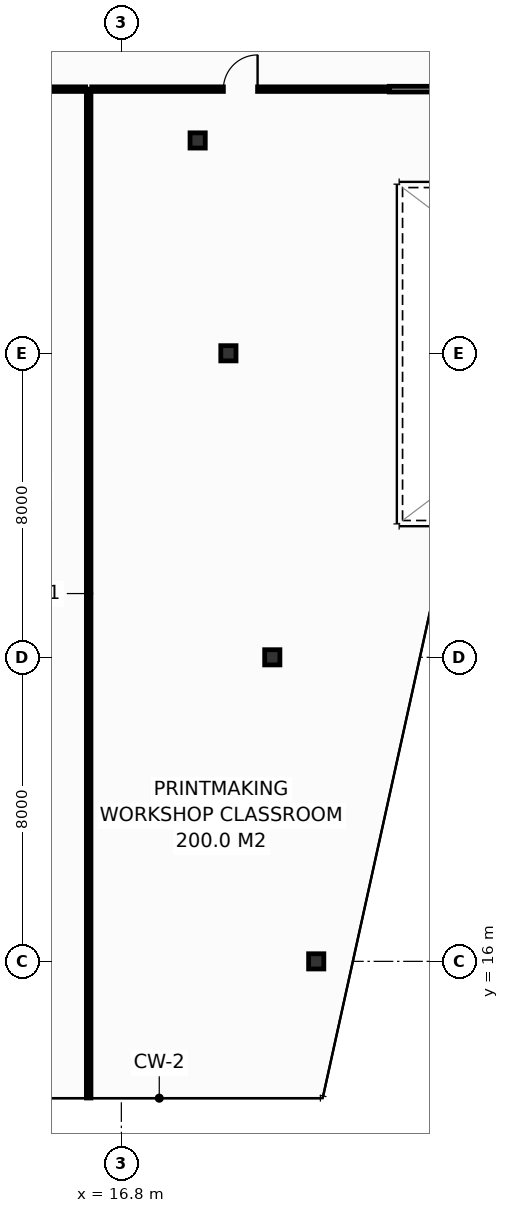
"""IFC4 building model, lengths in metres.
Left out: names, types, materials, properties, quantities, classifications, styles, units other than length and angle.
Written with IfcOpenShell. Run it as: python <this file> out.ifc"""

import sys

from ifc_helpers import new_model, si_unit, direction, frame, frame_2d, origin, origin_2d, place, context, subcontext, project, spatial, rectangle, hollow_rectangle, extrude, element, fill, save


model = new_model("IFC4")
c1 = context("Model", 3, precision=1e-05, world=origin(), true_north=direction((0.0, 1.0)))
c2 = subcontext(c1, "Body", "Model", "MODEL_VIEW")
j1 = project(units=[si_unit("LENGTHUNIT", "METRE"), si_unit("PLANEANGLEUNIT", "RADIAN")], contexts=[c1])
p1 = place(None, origin())
s1 = spatial("IfcSite", under=j1, at=p1, CompositionType="ELEMENT")
p2 = place(p1, origin())
s2 = spatial("IfcBuilding", under=s1, at=p2, CompositionType="ELEMENT")
p3 = place(p2, frame((0.0, 0.0, 220.8)))
s3 = spatial("IfcBuildingStorey", under=s2, at=p3, CompositionType="ELEMENT", Elevation=220.8)
for number, where, z_axis, x_axis in (
    (1, (21.928, 16.0, 0.0), (0.0, 0.0, 1.0), (1.0, 0.0, 0.0)),
    (2, (20.772, 24.0, 0.0), (0.0, 0.0, 1.0), (1.0, 0.0, 0.0)),
    (3, (19.617, 32.0, 0.0), (0.0, 0.0, 1.0), (1.0, 0.0, 0.0)),
    (4, (18.808, 37.6, 0.0), (0.0, 0.0, 1.0), (1.0, 0.0, 0.0)),
):
    element("IfcColumn", number, at=place(p3, frame(where, z_axis=z_axis, x_axis=x_axis)), inside=s3, PredefinedType="COLUMN", context=c2, shape_type="SweptSolid", body=[
        extrude(hollow_rectangle(XDim=0.4, YDim=0.4, WallThickness=0.016, at=origin_2d()), origin(), (0.0, 0.0, 1.0), 3.8),
    ])
p4 = place(p3, frame((15.94, 12.405, 0.0), z_axis=(0.0, 0.0, 1.0), x_axis=(0.0, 1.0, 0.0)))
e5 = element("IfcWall", 5, at=p4, inside=s3, PredefinedType="PARTITIONING", context=c2, shape_type="SweptSolid", body=[
    extrude(rectangle(XDim=26.545, YDim=0.12, at=frame_2d((13.272, 0.0))), origin(), (0.0, 0.0, 1.0), 2.635),
])
p5 = place(p3, frame((6.363, 38.95, 0.0), z_axis=(0.0, 0.0, 1.0), x_axis=(1.0, 0.0, 0.0)))
e6 = element("IfcWall", 6, at=p5, inside=s3, PredefinedType="PARTITIONING", context=c2, shape_type="SweptSolid", body=[
    extrude(rectangle(XDim=9.497, YDim=0.12, at=frame_2d((4.749, 0.0))), origin(), (0.0, 0.0, 1.0), 2.835),
])
p6 = place(p5, frame((4.299, 0.0, 0.0)))
e7 = element("IfcOpeningElement", 7, at=p6, cuts=e6, PredefinedType="OPENING", context=c2, shape_type="SweptSolid", body=[
    extrude(rectangle(XDim=0.9, YDim=2.1, at=frame_2d((0.45, 1.05))), frame((0.0, 0.07, 0.0), z_axis=(0.0, -1.0, 0.0), x_axis=(1.0, 0.0, 0.0)), (0.0, 0.0, 1.0), 0.14),
])
p7 = place(p3, frame((16.02, 38.95, 0.0), z_axis=(0.0, 0.0, 1.0), x_axis=(1.0, 0.0, 0.0)))
e8 = element("IfcWall", 8, at=p7, inside=s3, PredefinedType="PARTITIONING", context=c2, shape_type="SweptSolid", body=[
    extrude(rectangle(XDim=7.83, YDim=0.12, at=frame_2d((3.915, 0.0))), origin(), (0.0, 0.0, 1.0), 2.635),
])
p8 = place(p7, frame((3.465, 0.0, 0.0)))
e9 = element("IfcOpeningElement", 9, at=p8, cuts=e8, PredefinedType="OPENING", context=c2, shape_type="SweptSolid", body=[
    extrude(rectangle(XDim=0.9, YDim=2.1, at=frame_2d((0.45, 1.05))), frame((0.0, 0.07, 0.0), z_axis=(0.0, -1.0, 0.0), x_axis=(1.0, 0.0, 0.0)), (0.0, 0.0, 1.0), 0.14),
])
p9 = place(p3, frame((23.85, 38.95, 0.0), z_axis=(0.0, 0.0, 1.0), x_axis=(1.0, 0.0, 0.0)))
e10 = element("IfcWall", 10, at=p9, inside=s3, PredefinedType="PARTITIONING", context=c2, shape_type="SweptSolid", body=[
    extrude(rectangle(XDim=12.3, YDim=0.15, at=frame_2d((6.15, 0.0))), origin(), (0.0, 0.0, 1.0), 3.35),
])
p10 = place(p8, origin())
e11 = element("IfcDoor", 11, at=p10, inside=s3, OperationType="SINGLE_SWING_RIGHT", PredefinedType="DOOR", context=c2, shape_type="SweptSolid", body=[
    extrude(rectangle(XDim=0.9, YDim=2.1, at=frame_2d((0.45, 1.05))), frame((0.0, 0.025, 0.0), z_axis=(0.0, -1.0, 0.0), x_axis=(1.0, 0.0, 0.0)), (0.0, 0.0, 1.0), 0.05),
])
fill(e9, e11)
save(model, sys.argv[1])
